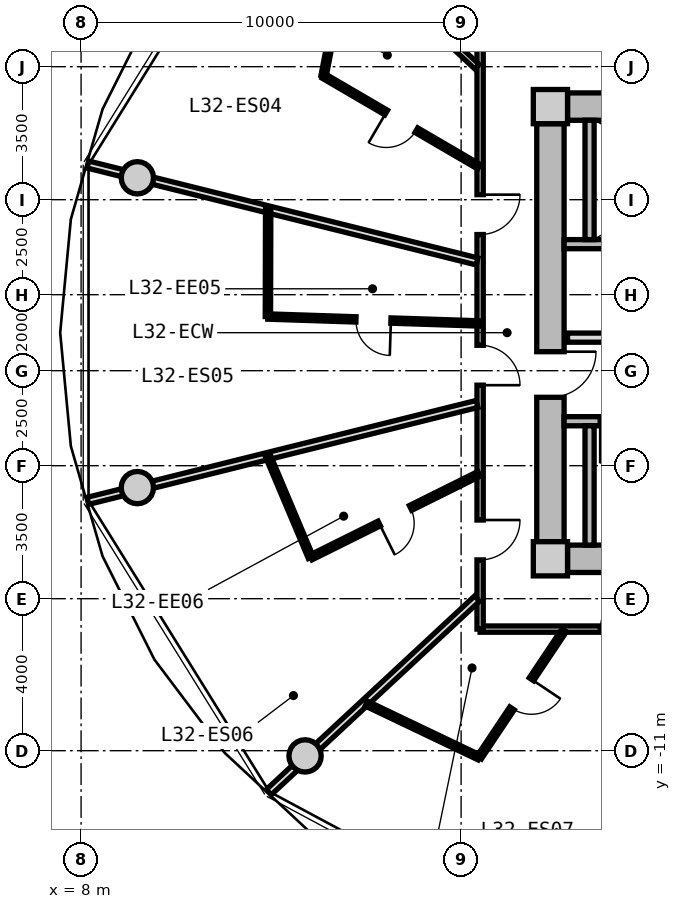
"""IFC4 building model, lengths in metres.
Left out: names, types, materials, properties, quantities, classifications, styles, units other than length and angle.
Written with IfcOpenShell. Run it as: python <this file> out.ifc"""

import sys

from ifc_helpers import new_model, si_unit, direction, frame, frame_2d, origin, origin_2d, place, context, subcontext, project, spatial, rectangle, circle, extrude, source, transform, mapped, element, fill, save


model = new_model("IFC4")
c1 = context("Model", 3, precision=1e-05, world=origin(), true_north=direction((0.0, 1.0)))
c2 = subcontext(c1, "Body", "Model", "MODEL_VIEW")
j1 = project(units=[si_unit("LENGTHUNIT", "METRE"), si_unit("PLANEANGLEUNIT", "RADIAN")], contexts=[c1])
p1 = place(None, origin())
s1 = spatial("IfcSite", under=j1, at=p1, CompositionType="ELEMENT")
p2 = place(p1, origin())
s2 = spatial("IfcBuilding", under=s1, at=p2, CompositionType="ELEMENT")
p3 = place(p2, frame((0.0, 0.0, 105.4)))
s3 = spatial("IfcBuildingStorey", under=s2, at=p3, CompositionType="ELEMENT", Elevation=105.4)
m1 = source(origin(), c2, "Body", "SweptSolid", [
    extrude(rectangle(XDim=0.9, YDim=0.9, at=origin_2d()), origin(), (0.0, 0.0, 1.0), 3.05),
])
for number, where, z_axis, x_axis in (
    (1, (20.35, -5.95, 0.0), (0.0, 0.0, 1.0), (1.0, 0.0, 0.0)),
    (2, (20.35, 5.95, 0.0), (0.0, 0.0, 1.0), (1.0, 0.0, 0.0)),
):
    element("IfcColumn", number, at=place(p3, frame(where, z_axis=z_axis, x_axis=x_axis)), inside=s3, PredefinedType="COLUMN", context=c2, shape_type="MappedRepresentation", body=[
        mapped(m1, transform((0.0, 0.0, 0.0), x_axis=(1.0, 0.0, 0.0), y_axis=(0.0, 1.0, 0.0), z_axis=(0.0, 0.0, 1.0), scale=1.0)),
    ])
m2 = source(origin(), c2, "Body", "SweptSolid", [
    extrude(rectangle(XDim=14.4, YDim=0.72, at=frame_2d((7.2, 0.0))), origin(), (0.0, 0.0, 1.0), 2.79),
])
for number, where, z_axis, x_axis in (
    (3, (20.8, 5.95, 0.0), (0.0, 0.0, 1.0), (1.0, 0.0, 0.0)),
    (4, (35.2, -5.95, 0.0), (0.0, 0.0, 1.0), (-1.0, 0.0, 0.0)),
):
    element("IfcWall", number, at=place(p3, frame(where, z_axis=z_axis, x_axis=x_axis)), inside=s3, PredefinedType="SHEAR", context=c2, shape_type="MappedRepresentation", body=[
        mapped(m2, transform((0.0, 0.0, 0.0), x_axis=(1.0, 0.0, 0.0), y_axis=(0.0, 1.0, 0.0), z_axis=(0.0, 0.0, 1.0), scale=1.0)),
    ])
m3 = source(origin(), c2, "Body", "SweptSolid", [
    extrude(rectangle(XDim=11.0, YDim=0.72, at=frame_2d((5.5, 0.0))), origin(), (0.0, 0.0, 1.0), 2.79),
])
p4 = place(p3, frame((20.35, -5.5, 0.0), z_axis=(0.0, 0.0, 1.0), x_axis=(0.0, 1.0, 0.0)))
e5 = element("IfcWall", 5, at=p4, inside=s3, PredefinedType="SHEAR", context=c2, shape_type="MappedRepresentation", body=[
    mapped(m3, transform((0.0, 0.0, 0.0), x_axis=(1.0, 0.0, 0.0), y_axis=(0.0, 1.0, 0.0), z_axis=(0.0, 0.0, 1.0), scale=1.0)),
])
p5 = place(p4, frame((3.8, 0.0, 0.0)))
e6 = element("IfcOpeningElement", 6, at=p5, cuts=e5, PredefinedType="OPENING", context=c2, shape_type="SweptSolid", body=[
    extrude(rectangle(XDim=1.2, YDim=2.15, at=frame_2d((0.6, 1.075))), frame((0.0, 0.37, 0.0), z_axis=(0.0, -1.0, 0.0), x_axis=(1.0, 0.0, 0.0)), (0.0, 0.0, 1.0), 0.74),
])
m4 = source(origin(), c2, "Body", "SweptSolid", [
    extrude(circle(Radius=0.425, at=origin_2d()), origin(), (0.0, 0.0, 1.0), 3.05),
])
for number, where, z_axis, x_axis in (
    (7, (9.481, 4.076, 0.0), (0.0, 0.0, 1.0), (1.0, 0.0, 0.0)),
    (8, (9.481, -4.076, 0.0), (0.0, 0.0, 1.0), (1.0, 0.0, 0.0)),
    (9, (13.894, -11.137, 0.0), (0.0, 0.0, 1.0), (1.0, 0.0, 0.0)),
):
    element("IfcColumn", number, at=place(p3, frame(where, z_axis=z_axis, x_axis=x_axis)), inside=s3, PredefinedType="COLUMN", context=c2, shape_type="MappedRepresentation", body=[
        mapped(m4, transform((0.0, 0.0, 0.0), x_axis=(1.0, 0.0, 0.0), y_axis=(0.0, 1.0, 0.0), z_axis=(0.0, 0.0, 1.0), scale=1.0)),
    ])
m5 = source(origin(), c2, "Body", "SweptSolid", [
    extrude(rectangle(XDim=7.83, YDim=0.24, at=frame_2d((3.915, 0.0))), origin(), (0.0, 0.0, 1.0), 2.79),
])
p6 = place(p3, frame((20.71, 2.33, 0.0), z_axis=(0.0, 0.0, 1.0), x_axis=(1.0, 0.0, 0.0)))
e10 = element("IfcWall", 10, at=p6, inside=s3, PredefinedType="PARTITIONING", context=c2, shape_type="MappedRepresentation", body=[
    mapped(m5, transform((0.0, 0.0, 0.0), x_axis=(1.0, 0.0, 0.0), y_axis=(0.0, 1.0, 0.0), z_axis=(0.0, 0.0, 1.0), scale=1.0)),
])
m6 = source(origin(), c2, "Body", "SweptSolid", [
    extrude(rectangle(XDim=3.14, YDim=0.24, at=frame_2d((1.57, 0.0))), origin(), (0.0, 0.0, 1.0), 2.79),
])
p7 = place(p3, frame((21.38, 2.45, 0.0), z_axis=(0.0, 0.0, 1.0), x_axis=(0.0, 1.0, 0.0)))
e11 = element("IfcWall", 11, at=p7, inside=s3, PredefinedType="PARTITIONING", context=c2, shape_type="MappedRepresentation", body=[
    mapped(m6, transform((0.0, 0.0, 0.0), x_axis=(1.0, 0.0, 0.0), y_axis=(0.0, 1.0, 0.0), z_axis=(0.0, 0.0, 1.0), scale=1.0)),
])
p8 = place(p3, frame((20.71, -2.33, 0.0), z_axis=(0.0, 0.0, 1.0), x_axis=(1.0, 0.0, 0.0)))
e12 = element("IfcWall", 12, at=p8, inside=s3, PredefinedType="PARTITIONING", context=c2, shape_type="MappedRepresentation", body=[
    mapped(m5, transform((0.0, 0.0, 0.0), x_axis=(1.0, 0.0, 0.0), y_axis=(0.0, 1.0, 0.0), z_axis=(0.0, 0.0, 1.0), scale=1.0)),
])
p9 = place(p8, frame((0.95, 0.0, 0.0)))
e13 = element("IfcOpeningElement", 13, at=p9, cuts=e12, PredefinedType="OPENING", context=c2, shape_type="SweptSolid", body=[
    extrude(rectangle(XDim=1.1, YDim=2.15, at=frame_2d((0.55, 1.075))), frame((0.0, 0.13, 0.0), z_axis=(0.0, -1.0, 0.0), x_axis=(1.0, 0.0, 0.0)), (0.0, 0.0, 1.0), 0.26),
])
p10 = place(p3, frame((21.38, -5.59, 0.0), z_axis=(0.0, 0.0, 1.0), x_axis=(0.0, 1.0, 0.0)))
e14 = element("IfcWall", 14, at=p10, inside=s3, PredefinedType="PARTITIONING", context=c2, shape_type="MappedRepresentation", body=[
    mapped(m6, transform((0.0, 0.0, 0.0), x_axis=(1.0, 0.0, 0.0), y_axis=(0.0, 1.0, 0.0), z_axis=(0.0, 0.0, 1.0), scale=1.0)),
])
m7 = source(origin(), c2, "Body", "SweptSolid", [
    extrude(rectangle(XDim=7.62, YDim=0.24, at=frame_2d((3.81, 0.0))), origin(), (0.0, 0.0, 1.0), 2.775),
])
p11 = place(p3, frame((20.8, -0.13, 0.0), z_axis=(0.0, 0.0, 1.0), x_axis=(1.0, 0.0, 0.0)))
e15 = element("IfcWall", 15, at=p11, inside=s3, PredefinedType="PARTITIONING", context=c2, shape_type="MappedRepresentation", body=[
    mapped(m7, transform((0.0, 0.0, 0.0), x_axis=(1.0, 0.0, 0.0), y_axis=(0.0, 1.0, 0.0), z_axis=(0.0, 0.0, 1.0), scale=1.0)),
])
p12 = place(p11, frame((6.22, 0.0, 0.0)))
e16 = element("IfcOpeningElement", 16, at=p12, cuts=e15, PredefinedType="OPENING", context=c2, shape_type="SweptSolid", body=[
    extrude(rectangle(XDim=1.0, YDim=2.1, at=frame_2d((0.5, 1.05))), frame((0.0, 0.13, 0.0), z_axis=(0.0, -1.0, 0.0), x_axis=(1.0, 0.0, 0.0)), (0.0, 0.0, 1.0), 0.26),
])
p13 = place(p11, frame((2.4, 0.0, 0.0)))
e17 = element("IfcOpeningElement", 17, at=p13, cuts=e15, PredefinedType="OPENING", context=c2, shape_type="SweptSolid", body=[
    extrude(rectangle(XDim=1.0, YDim=2.1, at=frame_2d((0.5, 1.05))), frame((0.0, 0.13, 0.0), z_axis=(0.0, -1.0, 0.0), x_axis=(1.0, 0.0, 0.0)), (0.0, 0.0, 1.0), 0.26),
])
m8 = source(origin(), c2, "Body", "SweptSolid", [
    extrude(rectangle(XDim=8.6, YDim=0.165, at=frame_2d((4.3, 0.0))), origin(), (0.0, 0.0, 1.0), 2.775),
])
p14 = place(p3, frame((27.1, -7.8, 0.0), z_axis=(0.0, 0.0, 1.0), x_axis=(-1.0, 0.0, 0.0)))
e18 = element("IfcWall", 18, at=p14, inside=s3, PredefinedType="PARTITIONING", context=c2, shape_type="MappedRepresentation", body=[
    mapped(m8, transform((0.0, 0.0, 0.0), x_axis=(1.0, 0.0, 0.0), y_axis=(0.0, 1.0, 0.0), z_axis=(0.0, 0.0, 1.0), scale=1.0)),
])
p15 = place(p14, frame((4.384, 0.0, 0.0)))
e19 = element("IfcOpeningElement", 19, at=p15, cuts=e18, PredefinedType="OPENING", context=c2, shape_type="SweptSolid", body=[
    extrude(rectangle(XDim=1.05, YDim=2.15, at=frame_2d((0.525, 1.075))), frame((0.0, 0.093, 0.0), z_axis=(0.0, -1.0, 0.0), x_axis=(1.0, 0.0, 0.0)), (0.0, 0.0, 1.0), 0.185),
])
m9 = source(origin(), c2, "Body", "SweptSolid", [
    extrude(rectangle(XDim=15.6, YDim=0.165, at=frame_2d((7.8, 0.0))), origin(), (0.0, 0.0, 1.0), 2.775),
])
p16 = place(p3, frame((18.5, -7.8, 0.0), z_axis=(0.0, 0.0, 1.0), x_axis=(0.0, 1.0, 0.0)))
e20 = element("IfcWall", 20, at=p16, inside=s3, PredefinedType="PARTITIONING", context=c2, shape_type="MappedRepresentation", body=[
    mapped(m9, transform((0.0, 0.0, 0.0), x_axis=(1.0, 0.0, 0.0), y_axis=(0.0, 1.0, 0.0), z_axis=(0.0, 0.0, 1.0), scale=1.0)),
])
p17 = place(p16, frame((10.383, 0.0, 0.0)))
e21 = element("IfcOpeningElement", 21, at=p17, cuts=e20, PredefinedType="OPENING", context=c2, shape_type="SweptSolid", body=[
    extrude(rectangle(XDim=1.05, YDim=2.15, at=frame_2d((0.525, 1.075))), frame((0.0, 0.093, 0.0), z_axis=(0.0, -1.0, 0.0), x_axis=(1.0, 0.0, 0.0)), (0.0, 0.0, 1.0), 0.185),
])
p18 = place(p16, frame((6.419, 0.0, 0.0)))
e22 = element("IfcOpeningElement", 22, at=p18, cuts=e20, PredefinedType="OPENING", context=c2, shape_type="SweptSolid", body=[
    extrude(rectangle(XDim=1.05, YDim=2.15, at=frame_2d((0.525, 1.075))), frame((0.0, 0.093, 0.0), z_axis=(0.0, -1.0, 0.0), x_axis=(1.0, 0.0, 0.0)), (0.0, 0.0, 1.0), 0.185),
])
p19 = place(p16, frame((1.821, 0.0, 0.0)))
e23 = element("IfcOpeningElement", 23, at=p19, cuts=e20, PredefinedType="OPENING", context=c2, shape_type="SweptSolid", body=[
    extrude(rectangle(XDim=1.05, YDim=2.15, at=frame_2d((0.525, 1.075))), frame((0.0, 0.093, 0.0), z_axis=(0.0, -1.0, 0.0), x_axis=(1.0, 0.0, 0.0)), (0.0, 0.0, 1.0), 0.185),
])
m10 = source(origin(), c2, "Body", "SweptSolid", [
    extrude(rectangle(XDim=7.482, YDim=0.165, at=frame_2d((3.741, 0.0))), origin(), (0.0, 0.0, 1.0), 2.275),
])
p20 = place(p3, frame((18.42, 6.998, 0.0), z_axis=(0.0, 0.0, 1.0), x_axis=(-0.732508698043, 0.680757671489, 0.0)))
e24 = element("IfcWall", 24, at=p20, inside=s3, PredefinedType="PARTITIONING", context=c2, shape_type="MappedRepresentation", body=[
    mapped(m10, transform((0.0, 0.0, 0.0), x_axis=(1.0, 0.0, 0.0), y_axis=(0.0, 1.0, 0.0), z_axis=(0.0, 0.0, 1.0), scale=1.0)),
])
m11 = source(origin(), c2, "Body", "SweptSolid", [
    extrude(rectangle(XDim=8.989, YDim=0.165, at=frame_2d((4.495, 0.0))), origin(), (0.0, 0.0, 1.0), 2.275),
])
p21 = place(p3, frame((23.678, -7.88, 0.0), z_axis=(0.0, 0.0, 1.0), x_axis=(-0.27702323008, -0.960863221274, 0.0)))
e25 = element("IfcWall", 25, at=p21, inside=s3, PredefinedType="PARTITIONING", context=c2, shape_type="MappedRepresentation", body=[
    mapped(m11, transform((0.0, 0.0, 0.0), x_axis=(1.0, 0.0, 0.0), y_axis=(0.0, 1.0, 0.0), z_axis=(0.0, 0.0, 1.0), scale=1.0)),
])
m12 = source(origin(), c2, "Body", "SweptSolid", [
    extrude(rectangle(XDim=10.556, YDim=0.19, at=frame_2d((5.278, 0.0))), origin(), (0.0, 0.0, 1.0), 2.275),
])
p22 = place(p3, frame((18.42, 1.875, 0.0), z_axis=(0.0, 0.0, 1.0), x_axis=(-0.970363857851, 0.241648470667, 0.0)))
e26 = element("IfcWall", 26, at=p22, inside=s3, PredefinedType="PARTITIONING", context=c2, shape_type="MappedRepresentation", body=[
    mapped(m12, transform((0.0, 0.0, 0.0), x_axis=(1.0, 0.0, 0.0), y_axis=(0.0, 1.0, 0.0), z_axis=(0.0, 0.0, 1.0), scale=1.0)),
])
m13 = source(origin(), c2, "Body", "SweptSolid", [
    extrude(rectangle(XDim=4.735, YDim=0.14, at=frame_2d((2.368, 0.0))), origin(), (0.0, 0.0, 1.0), 2.775),
])
p23 = place(p3, frame((18.47, 4.368, 0.0), z_axis=(0.0, 0.0, 1.0), x_axis=(-0.863537576642, 0.504284496814, 0.0)))
e27 = element("IfcWall", 27, at=p23, inside=s3, PredefinedType="PARTITIONING", context=c2, shape_type="MappedRepresentation", body=[
    mapped(m13, transform((0.0, 0.0, 0.0), x_axis=(1.0, 0.0, 0.0), y_axis=(0.0, 1.0, 0.0), z_axis=(0.0, 0.0, 1.0), scale=1.0)),
])
p24 = place(p23, frame((1.908, 0.0, 0.0)))
e28 = element("IfcOpeningElement", 28, at=p24, cuts=e27, PredefinedType="OPENING", context=c2, shape_type="SweptSolid", body=[
    extrude(rectangle(XDim=0.92, YDim=2.1, at=frame_2d((0.46, 1.05))), frame((0.0, 0.08, 0.0), z_axis=(0.0, -1.0, 0.0), x_axis=(1.0, 0.0, 0.0)), (0.0, 0.0, 1.0), 0.16),
])
m14 = source(origin(), c2, "Body", "SweptSolid", [
    extrude(rectangle(XDim=3.499, YDim=0.14, at=frame_2d((1.75, 0.0))), origin(), (0.0, 0.0, 1.0), 2.775),
])
p25 = place(p3, frame((14.381, 6.756, 0.0), z_axis=(0.0, 0.0, 1.0), x_axis=(0.18957713629, 0.981865830649, 0.0)))
e29 = element("IfcWall", 29, at=p25, inside=s3, PredefinedType="PARTITIONING", context=c2, shape_type="MappedRepresentation", body=[
    mapped(m14, transform((0.0, 0.0, 0.0), x_axis=(1.0, 0.0, 0.0), y_axis=(0.0, 1.0, 0.0), z_axis=(0.0, 0.0, 1.0), scale=1.0)),
])
p26 = place(p3, frame((18.42, -1.875, 0.0), z_axis=(0.0, 0.0, 1.0), x_axis=(-0.970363857851, -0.241648470667, 0.0)))
e30 = element("IfcWall", 30, at=p26, inside=s3, PredefinedType="PARTITIONING", context=c2, shape_type="MappedRepresentation", body=[
    mapped(m12, transform((0.0, 0.0, 0.0), x_axis=(1.0, 0.0, 0.0), y_axis=(0.0, 1.0, 0.0), z_axis=(0.0, 0.0, 1.0), scale=1.0)),
])
m15 = source(origin(), c2, "Body", "SweptSolid", [
    extrude(rectangle(XDim=5.557, YDim=0.14, at=frame_2d((2.778, 0.0))), origin(), (0.0, 0.0, 1.0), 2.775),
])
p27 = place(p3, frame((18.47, 0.244, 0.0), z_axis=(0.0, 0.0, 1.0), x_axis=(-0.999468495627, 0.03259948234, 0.0)))
e31 = element("IfcWall", 31, at=p27, inside=s3, PredefinedType="PARTITIONING", context=c2, shape_type="MappedRepresentation", body=[
    mapped(m15, transform((0.0, 0.0, 0.0), x_axis=(1.0, 0.0, 0.0), y_axis=(0.0, 1.0, 0.0), z_axis=(0.0, 0.0, 1.0), scale=1.0)),
])
p28 = place(p27, frame((2.318, 0.0, 0.0)))
e32 = element("IfcOpeningElement", 32, at=p28, cuts=e31, PredefinedType="OPENING", context=c2, shape_type="SweptSolid", body=[
    extrude(rectangle(XDim=0.92, YDim=2.1, at=frame_2d((0.46, 1.05))), frame((0.0, 0.08, 0.0), z_axis=(0.0, -1.0, 0.0), x_axis=(1.0, 0.0, 0.0)), (0.0, 0.0, 1.0), 0.16),
])
m16 = source(origin(), c2, "Body", "SweptSolid", [
    extrude(rectangle(XDim=2.837, YDim=0.14, at=frame_2d((1.418, 0.0))), origin(), (0.0, 0.0, 1.0), 2.775),
])
p29 = place(p3, frame((12.916, 0.425, 0.0), z_axis=(0.0, 0.0, 1.0), x_axis=(0.002409838945, 0.999997096334, 0.0)))
e33 = element("IfcWall", 33, at=p29, inside=s3, PredefinedType="PARTITIONING", context=c2, shape_type="MappedRepresentation", body=[
    mapped(m16, transform((0.0, 0.0, 0.0), x_axis=(1.0, 0.0, 0.0), y_axis=(0.0, 1.0, 0.0), z_axis=(0.0, 0.0, 1.0), scale=1.0)),
])
m17 = source(origin(), c2, "Body", "SweptSolid", [
    extrude(rectangle(XDim=7.482, YDim=0.19, at=frame_2d((3.741, 0.0))), origin(), (0.0, 0.0, 1.0), 2.275),
])
p30 = place(p3, frame((18.42, -6.998, 0.0), z_axis=(0.0, 0.0, 1.0), x_axis=(-0.732508698043, -0.680757671489, 0.0)))
e34 = element("IfcWall", 34, at=p30, inside=s3, PredefinedType="PARTITIONING", context=c2, shape_type="MappedRepresentation", body=[
    mapped(m17, transform((0.0, 0.0, 0.0), x_axis=(1.0, 0.0, 0.0), y_axis=(0.0, 1.0, 0.0), z_axis=(0.0, 0.0, 1.0), scale=1.0)),
])
m18 = source(origin(), c2, "Body", "SweptSolid", [
    extrude(rectangle(XDim=4.941, YDim=0.14, at=frame_2d((2.471, 0.0))), origin(), (0.0, 0.0, 1.0), 2.775),
])
p31 = place(p3, frame((18.47, -3.717, 0.0), z_axis=(0.0, 0.0, 1.0), x_axis=(-0.89555083256, -0.444959218694, 0.0)))
e35 = element("IfcWall", 35, at=p31, inside=s3, PredefinedType="PARTITIONING", context=c2, shape_type="MappedRepresentation", body=[
    mapped(m18, transform((0.0, 0.0, 0.0), x_axis=(1.0, 0.0, 0.0), y_axis=(0.0, 1.0, 0.0), z_axis=(0.0, 0.0, 1.0), scale=1.0)),
])
p32 = place(p31, frame((2.011, 0.0, 0.0)))
e36 = element("IfcOpeningElement", 36, at=p32, cuts=e35, PredefinedType="OPENING", context=c2, shape_type="SweptSolid", body=[
    extrude(rectangle(XDim=0.92, YDim=2.1, at=frame_2d((0.46, 1.05))), frame((0.0, 0.08, 0.0), z_axis=(0.0, -1.0, 0.0), x_axis=(1.0, 0.0, 0.0)), (0.0, 0.0, 1.0), 0.16),
])
m19 = source(origin(), c2, "Body", "SweptSolid", [
    extrude(rectangle(XDim=2.88, YDim=0.14, at=frame_2d((1.44, 0.0))), origin(), (0.0, 0.0, 1.0), 2.415),
])
p33 = place(p3, frame((14.045, -5.915, 0.0), z_axis=(0.0, 0.0, 1.0), x_axis=(-0.38878819597, 0.921327161585, 0.0)))
e37 = element("IfcWall", 37, at=p33, inside=s3, PredefinedType="PARTITIONING", context=c2, shape_type="MappedRepresentation", body=[
    mapped(m19, transform((0.0, 0.0, 0.0), x_axis=(1.0, 0.0, 0.0), y_axis=(0.0, 1.0, 0.0), z_axis=(0.0, 0.0, 1.0), scale=1.0)),
])
m20 = source(origin(), c2, "Body", "SweptSolid", [
    extrude(rectangle(XDim=4.027, YDim=0.14, at=frame_2d((2.014, 0.0))), origin(), (0.0, 0.0, 1.0), 2.775),
])
p34 = place(p3, frame((20.714, -7.83, 0.0), z_axis=(0.0, 0.0, 1.0), x_axis=(-0.555832825922, -0.831294093343, 0.0)))
e38 = element("IfcWall", 38, at=p34, inside=s3, PredefinedType="PARTITIONING", context=c2, shape_type="MappedRepresentation", body=[
    mapped(m20, transform((0.0, 0.0, 0.0), x_axis=(1.0, 0.0, 0.0), y_axis=(0.0, 1.0, 0.0), z_axis=(0.0, 0.0, 1.0), scale=1.0)),
])
p35 = place(p34, frame((1.554, 0.0, 0.0)))
e39 = element("IfcOpeningElement", 39, at=p35, cuts=e38, PredefinedType="OPENING", context=c2, shape_type="SweptSolid", body=[
    extrude(rectangle(XDim=0.92, YDim=2.1, at=frame_2d((0.46, 1.05))), frame((0.0, 0.08, 0.0), z_axis=(0.0, -1.0, 0.0), x_axis=(1.0, 0.0, 0.0)), (0.0, 0.0, 1.0), 0.16),
])
m21 = source(origin(), c2, "Body", "SweptSolid", [
    extrude(rectangle(XDim=3.291, YDim=0.14, at=frame_2d((1.646, 0.0))), origin(), (0.0, 0.0, 1.0), 2.775),
])
p36 = place(p3, frame((18.476, -11.178, 0.0), z_axis=(0.0, 0.0, 1.0), x_axis=(-0.902381393443, 0.430938302739, 0.0)))
e40 = element("IfcWall", 40, at=p36, inside=s3, PredefinedType="PARTITIONING", context=c2, shape_type="MappedRepresentation", body=[
    mapped(m21, transform((0.0, 0.0, 0.0), x_axis=(1.0, 0.0, 0.0), y_axis=(0.0, 1.0, 0.0), z_axis=(0.0, 0.0, 1.0), scale=1.0)),
])
m22 = source(origin(), c2, "Body", "SweptSolid", [
    extrude(rectangle(XDim=1.1, YDim=2.15, at=frame_2d((0.55, 1.075))), frame((0.0, 0.025, 0.0), z_axis=(0.0, -1.0, 0.0), x_axis=(1.0, 0.0, 0.0)), (0.0, 0.0, 1.0), 0.05),
])
p37 = place(p9, frame((1.1, 0.0, 0.0), z_axis=(0.0, 0.0, 1.0), x_axis=(-1.0, 0.0, 0.0)))
e41 = element("IfcDoor", 41, at=p37, inside=s3, OperationType="SINGLE_SWING_RIGHT", PredefinedType="DOOR", context=c2, shape_type="MappedRepresentation", body=[
    mapped(m22, transform((0.0, 0.0, 0.0), x_axis=(1.0, 0.0, 0.0), y_axis=(0.0, 1.0, 0.0), z_axis=(0.0, 0.0, 1.0), scale=1.0)),
])
fill(e13, e41)
m23 = source(origin(), c2, "Body", "SweptSolid", [
    extrude(rectangle(XDim=1.2, YDim=2.15, at=frame_2d((0.6, 1.075))), frame((0.0, 0.025, 0.0), z_axis=(0.0, -1.0, 0.0), x_axis=(1.0, 0.0, 0.0)), (0.0, 0.0, 1.0), 0.05),
])
p38 = place(p5, frame((1.2, 0.0, 0.0), z_axis=(0.0, 0.0, 1.0), x_axis=(-1.0, 0.0, 0.0)))
e42 = element("IfcDoor", 42, at=p38, inside=s3, OperationType="SINGLE_SWING_LEFT", PredefinedType="DOOR", context=c2, shape_type="MappedRepresentation", body=[
    mapped(m23, transform((0.0, 0.0, 0.0), x_axis=(1.0, 0.0, 0.0), y_axis=(0.0, 1.0, 0.0), z_axis=(0.0, 0.0, 1.0), scale=1.0)),
])
fill(e6, e42)
m24 = source(origin(), c2, "Body", "SweptSolid", [
    extrude(rectangle(XDim=1.05, YDim=2.15, at=frame_2d((0.525, 1.075))), frame((0.0, 0.025, 0.0), z_axis=(0.0, -1.0, 0.0), x_axis=(1.0, 0.0, 0.0)), (0.0, 0.0, 1.0), 0.05),
])
p39 = place(p17, frame((1.05, 0.0, 0.0), z_axis=(0.0, 0.0, 1.0), x_axis=(-1.0, 0.0, 0.0)))
e43 = element("IfcDoor", 43, at=p39, inside=s3, OperationType="SINGLE_SWING_LEFT", PredefinedType="DOOR", context=c2, shape_type="MappedRepresentation", body=[
    mapped(m24, transform((0.0, 0.0, 0.0), x_axis=(1.0, 0.0, 0.0), y_axis=(0.0, 1.0, 0.0), z_axis=(0.0, 0.0, 1.0), scale=1.0)),
])
fill(e21, e43)
m25 = source(origin(), c2, "Body", "SweptSolid", [
    extrude(rectangle(XDim=0.92, YDim=2.1, at=frame_2d((0.46, 1.05))), frame((0.0, 0.025, 0.0), z_axis=(0.0, -1.0, 0.0), x_axis=(1.0, 0.0, 0.0)), (0.0, 0.0, 1.0), 0.05),
])
p40 = place(p24, origin())
e44 = element("IfcDoor", 44, at=p40, inside=s3, OperationType="SINGLE_SWING_RIGHT", PredefinedType="DOOR", context=c2, shape_type="MappedRepresentation", body=[
    mapped(m25, transform((0.0, 0.0, 0.0), x_axis=(1.0, 0.0, 0.0), y_axis=(0.0, 1.0, 0.0), z_axis=(0.0, 0.0, 1.0), scale=1.0)),
])
fill(e28, e44)
p41 = place(p18, frame((1.05, 0.0, 0.0), z_axis=(0.0, 0.0, 1.0), x_axis=(-1.0, 0.0, 0.0)))
e45 = element("IfcDoor", 45, at=p41, inside=s3, OperationType="SINGLE_SWING_RIGHT", PredefinedType="DOOR", context=c2, shape_type="MappedRepresentation", body=[
    mapped(m24, transform((0.0, 0.0, 0.0), x_axis=(1.0, 0.0, 0.0), y_axis=(0.0, 1.0, 0.0), z_axis=(0.0, 0.0, 1.0), scale=1.0)),
])
fill(e22, e45)
p42 = place(p28, origin())
e46 = element("IfcDoor", 46, at=p42, inside=s3, OperationType="SINGLE_SWING_LEFT", PredefinedType="DOOR", context=c2, shape_type="MappedRepresentation", body=[
    mapped(m25, transform((0.0, 0.0, 0.0), x_axis=(1.0, 0.0, 0.0), y_axis=(0.0, 1.0, 0.0), z_axis=(0.0, 0.0, 1.0), scale=1.0)),
])
fill(e32, e46)
p43 = place(p19, frame((1.05, 0.0, 0.0), z_axis=(0.0, 0.0, 1.0), x_axis=(-1.0, 0.0, 0.0)))
e47 = element("IfcDoor", 47, at=p43, inside=s3, OperationType="SINGLE_SWING_LEFT", PredefinedType="DOOR", context=c2, shape_type="MappedRepresentation", body=[
    mapped(m24, transform((0.0, 0.0, 0.0), x_axis=(1.0, 0.0, 0.0), y_axis=(0.0, 1.0, 0.0), z_axis=(0.0, 0.0, 1.0), scale=1.0)),
])
fill(e23, e47)
p44 = place(p32, origin())
e48 = element("IfcDoor", 48, at=p44, inside=s3, OperationType="SINGLE_SWING_RIGHT", PredefinedType="DOOR", context=c2, shape_type="MappedRepresentation", body=[
    mapped(m25, transform((0.0, 0.0, 0.0), x_axis=(1.0, 0.0, 0.0), y_axis=(0.0, 1.0, 0.0), z_axis=(0.0, 0.0, 1.0), scale=1.0)),
])
fill(e36, e48)
p45 = place(p15, frame((1.05, 0.0, 0.0), z_axis=(0.0, 0.0, 1.0), x_axis=(-1.0, 0.0, 0.0)))
e49 = element("IfcDoor", 49, at=p45, inside=s3, OperationType="SINGLE_SWING_RIGHT", PredefinedType="DOOR", context=c2, shape_type="MappedRepresentation", body=[
    mapped(m24, transform((0.0, 0.0, 0.0), x_axis=(1.0, 0.0, 0.0), y_axis=(0.0, 1.0, 0.0), z_axis=(0.0, 0.0, 1.0), scale=1.0)),
])
fill(e19, e49)
p46 = place(p35, origin())
e50 = element("IfcDoor", 50, at=p46, inside=s3, OperationType="SINGLE_SWING_LEFT", PredefinedType="DOOR", context=c2, shape_type="MappedRepresentation", body=[
    mapped(m25, transform((0.0, 0.0, 0.0), x_axis=(1.0, 0.0, 0.0), y_axis=(0.0, 1.0, 0.0), z_axis=(0.0, 0.0, 1.0), scale=1.0)),
])
fill(e39, e50)
save(model, sys.argv[1])
